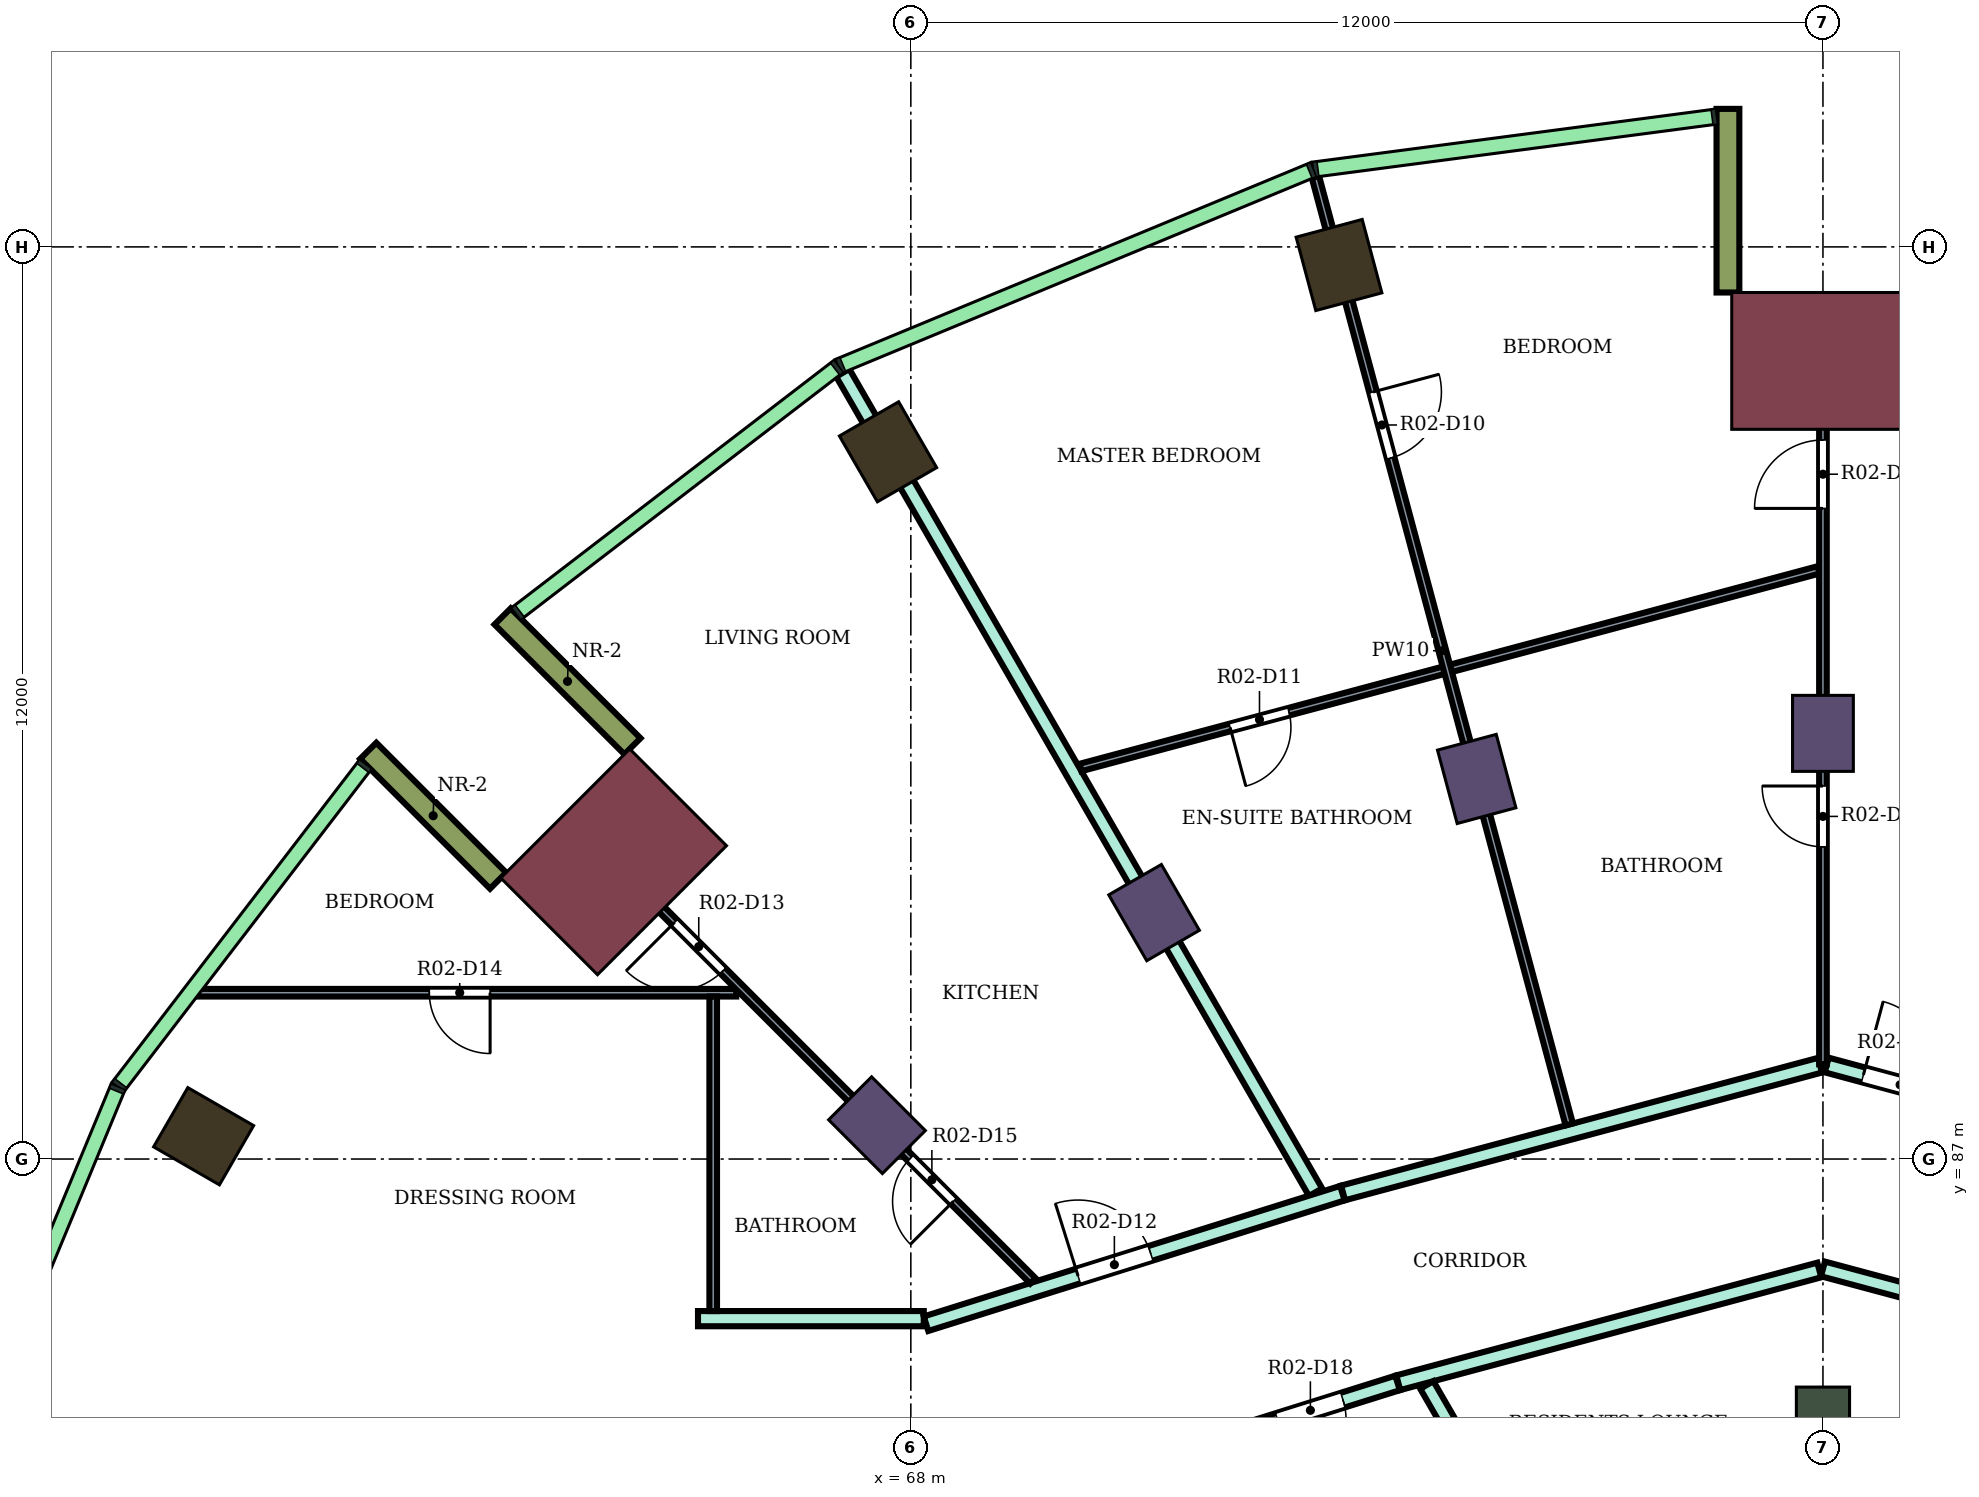
"""IFC4 building model, lengths in metres.
Left out: names, types, materials, properties, quantities, classifications, styles, units other than length and angle.
Written with IfcOpenShell. Run it as: python <this file> out.ifc"""

import sys

from ifc_helpers import new_model, si_unit, direction, frame, frame_2d, origin, origin_2d, place, context, subcontext, project, spatial, rectangle, extrude, element, fill, save


model = new_model("IFC4")
c1 = context("Model", 3, precision=1e-05, world=origin(), true_north=direction((0.0, 1.0)))
c2 = subcontext(c1, "Body", "Model", "MODEL_VIEW")
j1 = project(units=[si_unit("LENGTHUNIT", "METRE"), si_unit("PLANEANGLEUNIT", "RADIAN")], contexts=[c1])
p1 = place(None, origin())
s1 = spatial("IfcSite", under=j1, at=p1, CompositionType="ELEMENT")
p2 = place(p1, origin())
s2 = spatial("IfcBuilding", under=s1, at=p2, CompositionType="ELEMENT")
p3 = place(p2, frame((0.0, 0.0, 174.1)))
s3 = spatial("IfcBuildingStorey", under=s2, at=p3, CompositionType="ELEMENT", Elevation=174.1)
for number, where, z_axis, x_axis in (
    (1, (73.633, 98.762, 0.0), (0.0, 0.0, 1.0), (-0.259, 0.966, 0.0)),
    (2, (67.7, 96.304, 0.0), (0.0, 0.0, 1.0), (-0.5, 0.866, 0.0)),
    (3, (58.696, 87.3, 0.0), (0.0, 0.0, 1.0), (-0.866, 0.5, 0.0)),
):
    element("IfcColumn", number, at=place(p3, frame(where, z_axis=z_axis, x_axis=x_axis)), inside=s3, PredefinedType="COLUMN", context=c2, shape_type="SweptSolid", body=[
        extrude(rectangle(XDim=1.0, YDim=0.9, at=origin_2d()), origin(), (0.0, 0.0, 1.0), 4.1),
    ])
for number, where, z_axis, x_axis in (
    (4, (80.0, 92.6, 0.0), (0.0, 0.0, 1.0), (0.0, 1.0, 0.0)),
    (5, (75.445, 92.0, 0.0), (0.0, 0.0, 1.0), (-0.259, 0.966, 0.0)),
    (6, (71.2, 90.242, 0.0), (0.0, 0.0, 1.0), (-0.5, 0.866, 0.0)),
    (7, (67.555, 87.445, 0.0), (0.0, 0.0, 1.0), (-0.707, 0.707, 0.0)),
):
    element("IfcColumn", number, at=place(p3, frame(where, z_axis=z_axis, x_axis=x_axis)), inside=s3, PredefinedType="COLUMN", context=c2, shape_type="SweptSolid", body=[
        extrude(rectangle(XDim=1.0, YDim=0.8, at=origin_2d()), origin(), (0.0, 0.0, 1.0), 4.1),
    ])
p4 = place(p3, frame((80.0, 83.6, 0.0), z_axis=(0.0, 0.0, 1.0), x_axis=(0.0, 1.0, 0.0)))
e8 = element("IfcColumn", 8, at=p4, inside=s3, PredefinedType="COLUMN", context=c2, shape_type="SweptSolid", body=[
    extrude(rectangle(XDim=0.8, YDim=0.7, at=origin_2d()), origin(), (0.0, 0.0, 1.0), 4.1),
])
for number, where, z_axis, x_axis in (
    (9, (80.0, 97.5, 0.0), (0.0, 0.0, 1.0), (0.0, 1.0, 0.0)),
    (10, (64.09, 90.91, 0.0), (0.0, 0.0, 1.0), (-0.707, 0.707, 0.0)),
):
    element("IfcColumn", number, at=place(p3, frame(where, z_axis=z_axis, x_axis=x_axis)), inside=s3, PredefinedType="COLUMN", context=c2, shape_type="SweptSolid", body=[
        extrude(rectangle(XDim=1.8, YDim=2.4, at=origin_2d()), origin(), (0.0, 0.0, 1.0), 4.1),
    ])
for number, where, z_axis, x_axis in (
    (11, (78.75, 98.4, 0.0), (0.0, 0.0, 1.0), (0.0, 1.0, 0.0)),
    (12, (64.338, 92.43, 0.0), (0.0, 0.0, 1.0), (-0.707, 0.707, 0.0)),
    (13, (62.57, 90.662, 0.0), (0.0, 0.0, 1.0), (-0.707, 0.707, 0.0)),
):
    element("IfcWall", number, at=place(p3, frame(where, z_axis=z_axis, x_axis=x_axis)), inside=s3, PredefinedType="NOTDEFINED", context=c2, shape_type="SweptSolid", body=[
        extrude(rectangle(XDim=2.416, YDim=0.3, at=frame_2d((1.208, 0.0))), origin(), (0.0, 0.0, 1.0), 4.1),
    ])
p5 = place(p3, frame((65.2, 84.9, 0.0), z_axis=(0.0, 0.0, 1.0), x_axis=(1.0, 0.0, 0.0)))
e14 = element("IfcWall", 14, at=p5, inside=s3, PredefinedType="PARTITIONING", context=c2, shape_type="SweptSolid", body=[
    extrude(rectangle(XDim=2.97, YDim=0.2, at=frame_2d((1.485, 0.0))), origin(), (0.0, 0.0, 1.0), 3.65),
])
p6 = place(p3, frame((67.104, 97.343, 0.0), z_axis=(0.0, 0.0, 1.0), x_axis=(0.499841888023, -0.866116670534, 0.0)))
e15 = element("IfcWall", 15, at=p6, inside=s3, PredefinedType="PARTITIONING", context=c2, shape_type="SweptSolid", body=[
    extrude(rectangle(XDim=12.446, YDim=0.2, at=frame_2d((6.223, 0.0))), origin(), (0.0, 0.0, 1.0), 3.65),
])
p7 = place(p3, frame((68.2, 84.833, 0.0), z_axis=(0.0, 0.0, 1.0), x_axis=(0.954191968402, 0.299195065863, 0.0)))
e16 = element("IfcWall", 16, at=p7, inside=s3, PredefinedType="PARTITIONING", context=c2, shape_type="SweptSolid", body=[
    extrude(rectangle(XDim=5.74, YDim=0.2, at=frame_2d((2.87, 0.0))), origin(), (0.0, 0.0, 1.0), 3.65),
])
p8 = place(p7, frame((2.097, 0.0, 0.0)))
e17 = element("IfcOpeningElement", 17, at=p8, cuts=e16, PredefinedType="OPENING", context=c2, shape_type="SweptSolid", body=[
    extrude(rectangle(XDim=1.0, YDim=2.1, at=frame_2d((0.5, 1.05))), frame((0.0, 0.11, 0.0), z_axis=(0.0, -1.0, 0.0), x_axis=(1.0, 0.0, 0.0)), (0.0, 0.0, 1.0), 0.22),
])
p9 = place(p3, frame((72.1, 83.332, 0.0), z_axis=(0.0, 0.0, 1.0), x_axis=(0.954233106619, 0.299063836383, 0.0)))
e18 = element("IfcWall", 18, at=p9, inside=s3, PredefinedType="PARTITIONING", context=c2, shape_type="SweptSolid", body=[
    extrude(rectangle(XDim=2.414, YDim=0.2, at=frame_2d((1.207, 0.0))), origin(), (0.0, 0.0, 1.0), 3.65),
])
p10 = place(p9, frame((0.762, 0.0, 0.0)))
e19 = element("IfcOpeningElement", 19, at=p10, cuts=e18, PredefinedType="OPENING", context=c2, shape_type="SweptSolid", body=[
    extrude(rectangle(XDim=0.9, YDim=2.1, at=frame_2d((0.45, 1.05))), frame((0.0, 0.11, 0.0), z_axis=(0.0, -1.0, 0.0), x_axis=(1.0, 0.0, 0.0)), (0.0, 0.0, 1.0), 0.22),
])
p11 = place(p3, frame((73.687, 86.554, 0.0), z_axis=(0.0, 0.0, 1.0), x_axis=(0.96595928904, 0.258694128106, 0.0)))
e20 = element("IfcWall", 20, at=p11, inside=s3, PredefinedType="PARTITIONING", context=c2, shape_type="SweptSolid", body=[
    extrude(rectangle(XDim=6.496, YDim=0.2, at=frame_2d((3.248, 0.0))), origin(), (0.0, 0.0, 1.0), 3.65),
])
p12 = place(p3, frame((74.413, 84.057, 0.0), z_axis=(0.0, 0.0, 1.0), x_axis=(0.965970849692, 0.258650956976, 0.0)))
e21 = element("IfcWall", 21, at=p12, inside=s3, PredefinedType="PARTITIONING", context=c2, shape_type="SweptSolid", body=[
    extrude(rectangle(XDim=5.734, YDim=0.2, at=frame_2d((2.867, 0.0))), origin(), (0.0, 0.0, 1.0), 3.65),
])
p13 = place(p3, frame((74.788, 84.028, 0.0), z_axis=(0.0, 0.0, 1.0), x_axis=(0.499859501914, -0.866106505198, 0.0)))
e22 = element("IfcWall", 22, at=p13, inside=s3, PredefinedType="PARTITIONING", context=c2, shape_type="SweptSolid", body=[
    extrude(rectangle(XDim=2.724, YDim=0.2, at=frame_2d((1.362, 0.0))), origin(), (0.0, 0.0, 1.0), 3.65),
])
p14 = place(p3, frame((80.0, 85.554, 0.0), z_axis=(0.0, 0.0, 1.0), x_axis=(0.965894438951, -0.258936155845, 0.0)))
e23 = element("IfcWall", 23, at=p14, inside=s3, PredefinedType="PARTITIONING", context=c2, shape_type="SweptSolid", body=[
    extrude(rectangle(XDim=5.774, YDim=0.2, at=frame_2d((2.887, 0.0))), origin(), (0.0, 0.0, 1.0), 3.65),
])
p15 = place(p14, frame((1.841, 0.0, 0.0)))
e24 = element("IfcOpeningElement", 24, at=p15, cuts=e23, PredefinedType="OPENING", context=c2, shape_type="SweptSolid", body=[
    extrude(rectangle(XDim=1.8, YDim=2.1, at=frame_2d((0.9, 1.05))), frame((0.0, 0.11, 0.0), z_axis=(0.0, -1.0, 0.0), x_axis=(1.0, 0.0, 0.0)), (0.0, 0.0, 1.0), 0.22),
])
p16 = place(p3, frame((80.049, 88.237, 0.0), z_axis=(0.0, 0.0, 1.0), x_axis=(0.965582990495, -0.260095152718, 0.0)))
e25 = element("IfcWall", 25, at=p16, inside=s3, PredefinedType="PARTITIONING", context=c2, shape_type="SweptSolid", body=[
    extrude(rectangle(XDim=6.476, YDim=0.2, at=frame_2d((3.238, 0.0))), origin(), (0.0, 0.0, 1.0), 3.65),
])
p17 = place(p16, frame((0.5, 0.0, 0.0)))
e26 = element("IfcOpeningElement", 26, at=p17, cuts=e25, PredefinedType="OPENING", context=c2, shape_type="SweptSolid", body=[
    extrude(rectangle(XDim=1.0, YDim=2.1, at=frame_2d((0.5, 1.05))), frame((0.0, 0.11, 0.0), z_axis=(0.0, -1.0, 0.0), x_axis=(1.0, 0.0, 0.0)), (0.0, 0.0, 1.0), 0.22),
])
p18 = place(p3, frame((58.6, 89.188, 0.0), z_axis=(0.0, 0.0, 1.0), x_axis=(1.0, 0.0, 0.0)))
e27 = element("IfcWall", 27, at=p18, inside=s3, PredefinedType="PARTITIONING", context=c2, shape_type="SweptSolid", body=[
    extrude(rectangle(XDim=7.103, YDim=0.1, at=frame_2d((3.551, 0.0))), origin(), (0.0, 0.0, 1.0), 3.65),
])
p19 = place(p18, frame((3.065, 0.0, 0.0)))
e28 = element("IfcOpeningElement", 28, at=p19, cuts=e27, PredefinedType="OPENING", context=c2, shape_type="SweptSolid", body=[
    extrude(rectangle(XDim=0.8, YDim=2.1, at=frame_2d((0.4, 1.05))), frame((0.0, 0.06, 0.0), z_axis=(0.0, -1.0, 0.0), x_axis=(1.0, 0.0, 0.0)), (0.0, 0.0, 1.0), 0.12),
])
p20 = place(p3, frame((63.598, 91.407, 0.0), z_axis=(0.0, 0.0, 1.0), x_axis=(0.70700623685, -0.707207311228, 0.0)))
e29 = element("IfcWall", 29, at=p20, inside=s3, PredefinedType="PARTITIONING", context=c2, shape_type="SweptSolid", body=[
    extrude(rectangle(XDim=8.499, YDim=0.1, at=frame_2d((4.25, 0.0))), origin(), (0.0, 0.0, 1.0), 3.65),
])
p21 = place(p20, frame((1.83, 0.0, 0.0)))
e30 = element("IfcOpeningElement", 30, at=p21, cuts=e29, PredefinedType="OPENING", context=c2, shape_type="SweptSolid", body=[
    extrude(rectangle(XDim=0.9, YDim=2.1, at=frame_2d((0.45, 1.05))), frame((0.0, 0.06, 0.0), z_axis=(0.0, -1.0, 0.0), x_axis=(1.0, 0.0, 0.0)), (0.0, 0.0, 1.0), 0.12),
])
p22 = place(p20, frame((6.219, 0.0, 0.0)))
e31 = element("IfcOpeningElement", 31, at=p22, cuts=e29, PredefinedType="OPENING", context=c2, shape_type="SweptSolid", body=[
    extrude(rectangle(XDim=0.8, YDim=2.1, at=frame_2d((0.4, 1.05))), frame((0.0, 0.06, 0.0), z_axis=(0.0, -1.0, 0.0), x_axis=(1.0, 0.0, 0.0)), (0.0, 0.0, 1.0), 0.12),
])
p23 = place(p3, frame((65.4, 85.0, 0.0), z_axis=(0.0, 0.0, 1.0), x_axis=(0.0, 1.0, 0.0)))
e32 = element("IfcWall", 32, at=p23, inside=s3, PredefinedType="PARTITIONING", context=c2, shape_type="SweptSolid", body=[
    extrude(rectangle(XDim=4.138, YDim=0.1, at=frame_2d((2.069, 0.0))), origin(), (0.0, 0.0, 1.0), 3.65),
])
p24 = place(p3, frame((70.232, 92.151, 0.0), z_axis=(0.0, 0.0, 1.0), x_axis=(0.965980126086, 0.258616310405, 0.0)))
e33 = element("IfcWall", 33, at=p24, inside=s3, PredefinedType="PARTITIONING", context=c2, shape_type="SweptSolid", body=[
    extrude(rectangle(XDim=10.053, YDim=0.1, at=frame_2d((5.026, 0.0))), origin(), (0.0, 0.0, 1.0), 3.65),
])
p25 = place(p24, frame((2.038, 0.0, 0.0)))
e34 = element("IfcOpeningElement", 34, at=p25, cuts=e33, PredefinedType="OPENING", context=c2, shape_type="SweptSolid", body=[
    extrude(rectangle(XDim=0.8, YDim=2.1, at=frame_2d((0.4, 1.05))), frame((0.0, 0.06, 0.0), z_axis=(0.0, -1.0, 0.0), x_axis=(1.0, 0.0, 0.0)), (0.0, 0.0, 1.0), 0.12),
])
p26 = place(p3, frame((73.323, 99.919, 0.0), z_axis=(0.0, 0.0, 1.0), x_axis=(0.258768239436, -0.965939438194, 0.0)))
e35 = element("IfcWall", 35, at=p26, inside=s3, PredefinedType="PARTITIONING", context=c2, shape_type="SweptSolid", body=[
    extrude(rectangle(XDim=12.904, YDim=0.1, at=frame_2d((6.452, 0.0))), origin(), (0.0, 0.0, 1.0), 3.65),
])
p27 = place(p26, frame((2.927, 0.0, 0.0)))
e36 = element("IfcOpeningElement", 36, at=p27, cuts=e35, PredefinedType="OPENING", context=c2, shape_type="SweptSolid", body=[
    extrude(rectangle(XDim=0.9, YDim=2.1, at=frame_2d((0.45, 1.05))), frame((0.0, 0.06, 0.0), z_axis=(0.0, -1.0, 0.0), x_axis=(1.0, 0.0, 0.0)), (0.0, 0.0, 1.0), 0.12),
])
p28 = place(p3, frame((80.0, 88.246, 0.0), z_axis=(0.0, 0.0, 1.0), x_axis=(0.0, 1.0, 0.0)))
e37 = element("IfcWall", 37, at=p28, inside=s3, PredefinedType="PARTITIONING", context=c2, shape_type="SweptSolid", body=[
    extrude(rectangle(XDim=9.954, YDim=0.1, at=frame_2d((4.977, 0.0))), origin(), (0.0, 0.0, 1.0), 3.65),
])
p29 = place(p28, frame((7.313, 0.0, 0.0)))
e38 = element("IfcOpeningElement", 38, at=p29, cuts=e37, PredefinedType="OPENING", context=c2, shape_type="SweptSolid", body=[
    extrude(rectangle(XDim=0.9, YDim=2.1, at=frame_2d((0.45, 1.05))), frame((0.0, 0.06, 0.0), z_axis=(0.0, -1.0, 0.0), x_axis=(1.0, 0.0, 0.0)), (0.0, 0.0, 1.0), 0.12),
])
p30 = place(p28, frame((2.862, 0.0, 0.0)))
e39 = element("IfcOpeningElement", 39, at=p30, cuts=e37, PredefinedType="OPENING", context=c2, shape_type="SweptSolid", body=[
    extrude(rectangle(XDim=0.8, YDim=2.1, at=frame_2d((0.4, 1.05))), frame((0.0, 0.06, 0.0), z_axis=(0.0, -1.0, 0.0), x_axis=(1.0, 0.0, 0.0)), (0.0, 0.0, 1.0), 0.12),
])
p31 = place(p17, origin())
e40 = element("IfcDoor", 40, at=p31, inside=s3, OperationType="SINGLE_SWING_LEFT", PredefinedType="DOOR", context=c2, shape_type="SweptSolid", body=[
    extrude(rectangle(XDim=1.0, YDim=2.1, at=frame_2d((0.5, 1.05))), frame((0.0, 0.025, 0.0), z_axis=(0.0, -1.0, 0.0), x_axis=(1.0, 0.0, 0.0)), (0.0, 0.0, 1.0), 0.05),
])
fill(e26, e40)
p32 = place(p29, origin())
e41 = element("IfcDoor", 41, at=p32, inside=s3, OperationType="SINGLE_SWING_LEFT", PredefinedType="DOOR", context=c2, shape_type="SweptSolid", body=[
    extrude(rectangle(XDim=0.9, YDim=2.1, at=frame_2d((0.45, 1.05))), frame((0.0, 0.025, 0.0), z_axis=(0.0, -1.0, 0.0), x_axis=(1.0, 0.0, 0.0)), (0.0, 0.0, 1.0), 0.05),
])
fill(e38, e41)
p33 = place(p30, origin())
e42 = element("IfcDoor", 42, at=p33, inside=s3, OperationType="SINGLE_SWING_RIGHT", PredefinedType="DOOR", context=c2, shape_type="SweptSolid", body=[
    extrude(rectangle(XDim=0.8, YDim=2.1, at=frame_2d((0.4, 1.05))), frame((0.0, 0.025, 0.0), z_axis=(0.0, -1.0, 0.0), x_axis=(1.0, 0.0, 0.0)), (0.0, 0.0, 1.0), 0.05),
])
fill(e39, e42)
p34 = place(p27, origin())
e43 = element("IfcDoor", 43, at=p34, inside=s3, OperationType="SINGLE_SWING_LEFT", PredefinedType="DOOR", context=c2, shape_type="SweptSolid", body=[
    extrude(rectangle(XDim=0.9, YDim=2.1, at=frame_2d((0.45, 1.05))), frame((0.0, 0.025, 0.0), z_axis=(0.0, -1.0, 0.0), x_axis=(1.0, 0.0, 0.0)), (0.0, 0.0, 1.0), 0.05),
])
fill(e36, e43)
p35 = place(p25, frame((0.8, 0.0, 0.0), z_axis=(0.0, 0.0, 1.0), x_axis=(-1.0, 0.0, 0.0)))
e44 = element("IfcDoor", 44, at=p35, inside=s3, OperationType="SINGLE_SWING_RIGHT", PredefinedType="DOOR", context=c2, shape_type="SweptSolid", body=[
    extrude(rectangle(XDim=0.8, YDim=2.1, at=frame_2d((0.4, 1.05))), frame((0.0, 0.025, 0.0), z_axis=(0.0, -1.0, 0.0), x_axis=(1.0, 0.0, 0.0)), (0.0, 0.0, 1.0), 0.05),
])
fill(e34, e44)
p36 = place(p8, origin())
e45 = element("IfcDoor", 45, at=p36, inside=s3, OperationType="SINGLE_SWING_LEFT", PredefinedType="DOOR", context=c2, shape_type="SweptSolid", body=[
    extrude(rectangle(XDim=1.0, YDim=2.1, at=frame_2d((0.5, 1.05))), frame((0.0, 0.025, 0.0), z_axis=(0.0, -1.0, 0.0), x_axis=(1.0, 0.0, 0.0)), (0.0, 0.0, 1.0), 0.05),
])
fill(e17, e45)
p37 = place(p21, frame((0.9, 0.0, 0.0), z_axis=(0.0, 0.0, 1.0), x_axis=(-1.0, 0.0, 0.0)))
e46 = element("IfcDoor", 46, at=p37, inside=s3, OperationType="SINGLE_SWING_RIGHT", PredefinedType="DOOR", context=c2, shape_type="SweptSolid", body=[
    extrude(rectangle(XDim=0.9, YDim=2.1, at=frame_2d((0.45, 1.05))), frame((0.0, 0.025, 0.0), z_axis=(0.0, -1.0, 0.0), x_axis=(1.0, 0.0, 0.0)), (0.0, 0.0, 1.0), 0.05),
])
fill(e30, e46)
p38 = place(p19, frame((0.8, 0.0, 0.0), z_axis=(0.0, 0.0, 1.0), x_axis=(-1.0, 0.0, 0.0)))
e47 = element("IfcDoor", 47, at=p38, inside=s3, OperationType="SINGLE_SWING_LEFT", PredefinedType="DOOR", context=c2, shape_type="SweptSolid", body=[
    extrude(rectangle(XDim=0.8, YDim=2.1, at=frame_2d((0.4, 1.05))), frame((0.0, 0.025, 0.0), z_axis=(0.0, -1.0, 0.0), x_axis=(1.0, 0.0, 0.0)), (0.0, 0.0, 1.0), 0.05),
])
fill(e28, e47)
p39 = place(p22, frame((0.8, 0.0, 0.0), z_axis=(0.0, 0.0, 1.0), x_axis=(-1.0, 0.0, 0.0)))
e48 = element("IfcDoor", 48, at=p39, inside=s3, OperationType="SINGLE_SWING_LEFT", PredefinedType="DOOR", context=c2, shape_type="SweptSolid", body=[
    extrude(rectangle(XDim=0.8, YDim=2.1, at=frame_2d((0.4, 1.05))), frame((0.0, 0.025, 0.0), z_axis=(0.0, -1.0, 0.0), x_axis=(1.0, 0.0, 0.0)), (0.0, 0.0, 1.0), 0.05),
])
fill(e31, e48)
p40 = place(p10, frame((0.9, 0.0, 0.0), z_axis=(0.0, 0.0, 1.0), x_axis=(-1.0, 0.0, 0.0)))
e49 = element("IfcDoor", 49, at=p40, inside=s3, OperationType="SINGLE_SWING_RIGHT", PredefinedType="DOOR", context=c2, shape_type="SweptSolid", body=[
    extrude(rectangle(XDim=0.9, YDim=2.1, at=frame_2d((0.45, 1.05))), frame((0.0, 0.025, 0.0), z_axis=(0.0, -1.0, 0.0), x_axis=(1.0, 0.0, 0.0)), (0.0, 0.0, 1.0), 0.05),
])
fill(e19, e49)
save(model, sys.argv[1])
